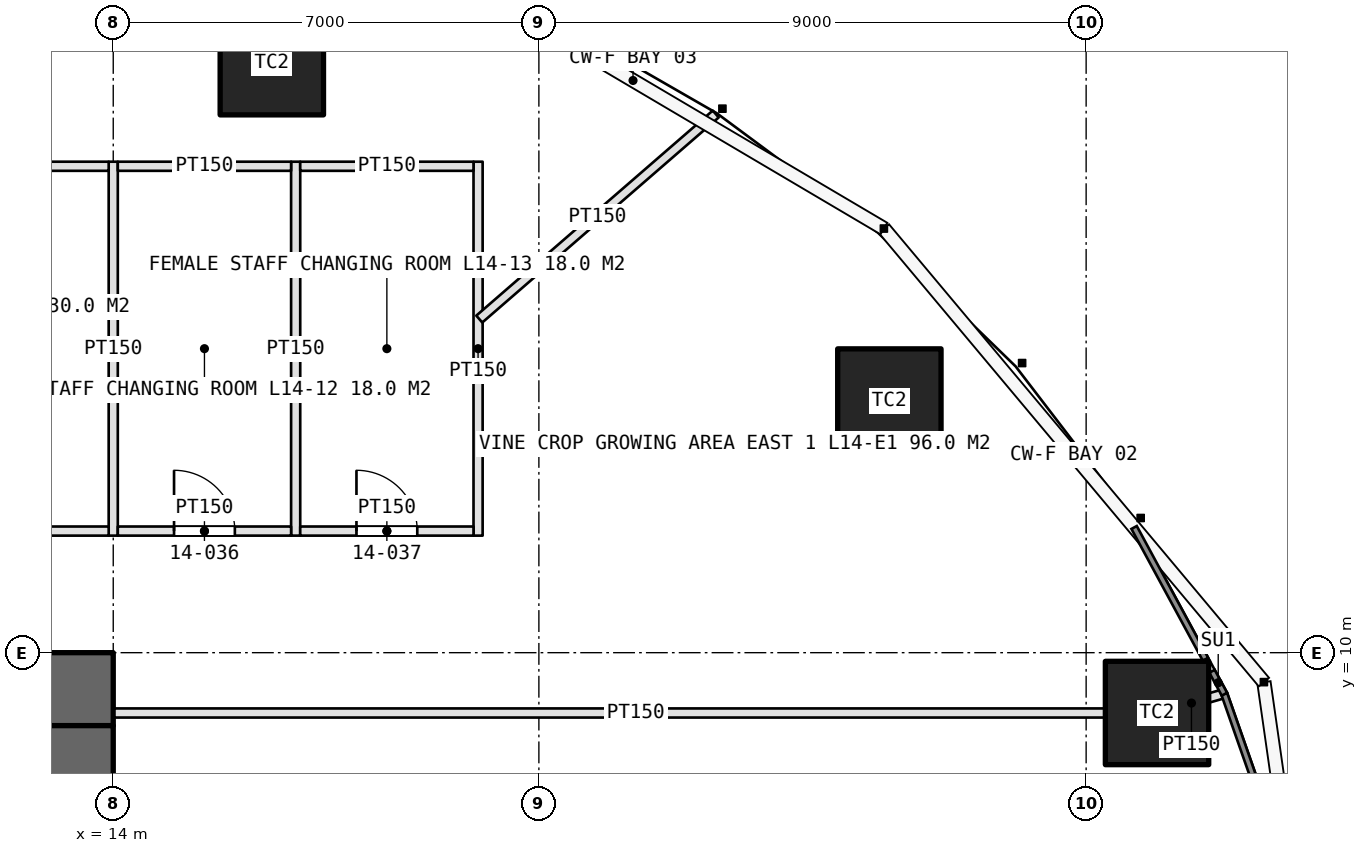
"""IFC4 building model, lengths in metres.
Left out: names, types, materials, properties, quantities, classifications, styles, units other than length and angle.
Written with IfcOpenShell. Run it as: python <this file> out.ifc"""

import sys

from ifc_helpers import new_model, si_unit, direction, frame, frame_2d, origin, origin_2d, place, context, subcontext, project, spatial, rectangle, extrude, element, fill, save


model = new_model("IFC4")
c1 = context("Model", 3, precision=1e-05, world=origin(), true_north=direction((0.0, 1.0)))
c2 = subcontext(c1, "Body", "Model", "MODEL_VIEW")
j1 = project(units=[si_unit("LENGTHUNIT", "METRE"), si_unit("PLANEANGLEUNIT", "RADIAN")], contexts=[c1])
p1 = place(None, origin())
s1 = spatial("IfcSite", under=j1, at=p1, CompositionType="ELEMENT")
p2 = place(p1, origin())
s2 = spatial("IfcBuilding", under=s1, at=p2, CompositionType="ELEMENT")
p3 = place(p2, frame((0.0, 0.0, 70.0)))
s3 = spatial("IfcBuildingStorey", under=s2, at=p3, CompositionType="ELEMENT", Elevation=70.0)
p4 = place(p3, frame((14.0, 9.4, 0.0), z_axis=(0.0, 0.0, 1.0), x_axis=(-1.0, 0.0, 0.0)))
e1 = element("IfcWall", 1, at=p4, inside=s3, PredefinedType="SHEAR", context=c2, shape_type="SweptSolid", body=[
    extrude(rectangle(XDim=28.0, YDim=1.2, at=frame_2d((14.0, 0.0))), origin(), (0.0, 0.0, 1.0), 5.0),
])
p5 = place(p4, frame((24.0, 0.0, 0.0)))
e2 = element("IfcOpeningElement", 2, at=p5, cuts=e1, PredefinedType="OPENING", context=c2, shape_type="SweptSolid", body=[
    extrude(rectangle(XDim=1.0, YDim=2.4, at=frame_2d((0.5, 1.2))), frame((0.0, 0.61, 0.0), z_axis=(0.0, -1.0, 0.0), x_axis=(1.0, 0.0, 0.0)), (0.0, 0.0, 1.0), 1.22),
])
p6 = place(p4, frame((13.1, 0.0, 0.0)))
e3 = element("IfcOpeningElement", 3, at=p6, cuts=e1, PredefinedType="OPENING", context=c2, shape_type="SweptSolid", body=[
    extrude(rectangle(XDim=1.8, YDim=2.4, at=frame_2d((0.9, 1.2))), frame((0.0, 0.61, 0.0), z_axis=(0.0, -1.0, 0.0), x_axis=(1.0, 0.0, 0.0)), (0.0, 0.0, 1.0), 1.22),
])
p7 = place(p3, frame((13.4, -8.8, 0.0), z_axis=(0.0, 0.0, 1.0), x_axis=(0.0, 1.0, 0.0)))
e4 = element("IfcWall", 4, at=p7, inside=s3, PredefinedType="SHEAR", context=c2, shape_type="SweptSolid", body=[
    extrude(rectangle(XDim=17.6, YDim=1.2, at=frame_2d((8.8, 0.0))), origin(), (0.0, 0.0, 1.0), 5.0),
])
p8 = place(p7, frame((7.9, 0.0, 0.0)))
e5 = element("IfcOpeningElement", 5, at=p8, cuts=e4, PredefinedType="OPENING", context=c2, shape_type="SweptSolid", body=[
    extrude(rectangle(XDim=1.8, YDim=2.4, at=frame_2d((0.9, 1.2))), frame((0.0, 0.61, 0.0), z_axis=(0.0, -1.0, 0.0), x_axis=(1.0, 0.0, 0.0)), (0.0, 0.0, 1.0), 1.22),
])
for number, where, z_axis, x_axis in (
    (6, (31.166, 9.008, 0.0), (0.0, 0.0, 1.0), (1.0, 0.0, 0.0)),
    (7, (26.764, 14.147, 0.0), (0.0, 0.0, 1.0), (1.0, 0.0, 0.0)),
    (8, (16.608, 19.695, 0.0), (0.0, 0.0, 1.0), (1.0, 0.0, 0.0)),
):
    element("IfcColumn", number, at=place(p3, frame(where, z_axis=z_axis, x_axis=x_axis)), inside=s3, PredefinedType="COLUMN", context=c2, shape_type="SweptSolid", body=[
        extrude(rectangle(XDim=1.7, YDim=1.7, at=origin_2d()), origin(), (0.0, 0.0, 1.0), 5.0),
    ])
for number, where, z_axis, x_axis in (
    (9, (14.0, 11.925, 0.0), (0.0, 0.0, 1.0), (0.0, 1.0, 0.0)),
    (10, (17.0, 11.925, 0.0), (0.0, 0.0, 1.0), (0.0, 1.0, 0.0)),
    (11, (20.0, 11.925, 0.0), (0.0, 0.0, 1.0), (0.0, 1.0, 0.0)),
):
    element("IfcWall", number, at=place(p3, frame(where, z_axis=z_axis, x_axis=x_axis)), inside=s3, PredefinedType="PARTITIONING", context=c2, shape_type="SweptSolid", body=[
        extrude(rectangle(XDim=6.15, YDim=0.15, at=frame_2d((3.075, 0.0))), origin(), (0.0, 0.0, 1.0), 3.6),
    ])
p9 = place(p3, frame((9.075, 12.0, 0.0), z_axis=(0.0, 0.0, 1.0), x_axis=(1.0, 0.0, 0.0)))
e12 = element("IfcWall", 12, at=p9, inside=s3, PredefinedType="PARTITIONING", context=c2, shape_type="SweptSolid", body=[
    extrude(rectangle(XDim=4.85, YDim=0.15, at=frame_2d((2.425, 0.0))), origin(), (0.0, 0.0, 1.0), 3.6),
])
p10 = place(p9, frame((1.875, 0.0, 0.0)))
e13 = element("IfcOpeningElement", 13, at=p10, cuts=e12, PredefinedType="OPENING", context=c2, shape_type="SweptSolid", body=[
    extrude(rectangle(XDim=1.1, YDim=2.3, at=frame_2d((0.55, 1.15))), frame((0.0, 0.085, 0.0), z_axis=(0.0, -1.0, 0.0), x_axis=(1.0, 0.0, 0.0)), (0.0, 0.0, 1.0), 0.17),
])
p11 = place(p3, frame((9.075, 18.0, 0.0), z_axis=(0.0, 0.0, 1.0), x_axis=(1.0, 0.0, 0.0)))
e14 = element("IfcWall", 14, at=p11, inside=s3, PredefinedType="PARTITIONING", context=c2, shape_type="SweptSolid", body=[
    extrude(rectangle(XDim=4.85, YDim=0.15, at=frame_2d((2.425, 0.0))), origin(), (0.0, 0.0, 1.0), 3.6),
])
p12 = place(p3, frame((14.075, 12.0, 0.0), z_axis=(0.0, 0.0, 1.0), x_axis=(1.0, 0.0, 0.0)))
e15 = element("IfcWall", 15, at=p12, inside=s3, PredefinedType="PARTITIONING", context=c2, shape_type="SweptSolid", body=[
    extrude(rectangle(XDim=2.85, YDim=0.15, at=frame_2d((1.425, 0.0))), origin(), (0.0, 0.0, 1.0), 3.6),
])
p13 = place(p12, frame((0.925, 0.0, 0.0)))
e16 = element("IfcOpeningElement", 16, at=p13, cuts=e15, PredefinedType="OPENING", context=c2, shape_type="SweptSolid", body=[
    extrude(rectangle(XDim=1.0, YDim=2.2, at=frame_2d((0.5, 1.1))), frame((0.0, 0.085, 0.0), z_axis=(0.0, -1.0, 0.0), x_axis=(1.0, 0.0, 0.0)), (0.0, 0.0, 1.0), 0.17),
])
p14 = place(p3, frame((14.075, 18.0, 0.0), z_axis=(0.0, 0.0, 1.0), x_axis=(1.0, 0.0, 0.0)))
e17 = element("IfcWall", 17, at=p14, inside=s3, PredefinedType="PARTITIONING", context=c2, shape_type="SweptSolid", body=[
    extrude(rectangle(XDim=2.85, YDim=0.15, at=frame_2d((1.425, 0.0))), origin(), (0.0, 0.0, 1.0), 3.6),
])
p15 = place(p3, frame((17.075, 12.0, 0.0), z_axis=(0.0, 0.0, 1.0), x_axis=(1.0, 0.0, 0.0)))
e18 = element("IfcWall", 18, at=p15, inside=s3, PredefinedType="PARTITIONING", context=c2, shape_type="SweptSolid", body=[
    extrude(rectangle(XDim=2.85, YDim=0.15, at=frame_2d((1.425, 0.0))), origin(), (0.0, 0.0, 1.0), 3.6),
])
p16 = place(p15, frame((0.925, 0.0, 0.0)))
e19 = element("IfcOpeningElement", 19, at=p16, cuts=e18, PredefinedType="OPENING", context=c2, shape_type="SweptSolid", body=[
    extrude(rectangle(XDim=1.0, YDim=2.2, at=frame_2d((0.5, 1.1))), frame((0.0, 0.085, 0.0), z_axis=(0.0, -1.0, 0.0), x_axis=(1.0, 0.0, 0.0)), (0.0, 0.0, 1.0), 0.17),
])
p17 = place(p3, frame((17.075, 18.0, 0.0), z_axis=(0.0, 0.0, 1.0), x_axis=(1.0, 0.0, 0.0)))
e20 = element("IfcWall", 20, at=p17, inside=s3, PredefinedType="PARTITIONING", context=c2, shape_type="SweptSolid", body=[
    extrude(rectangle(XDim=2.85, YDim=0.15, at=frame_2d((1.425, 0.0))), origin(), (0.0, 0.0, 1.0), 3.6),
])
p18 = place(p3, frame((20.02, 15.487, 0.0), z_axis=(0.0, 0.0, 1.0), x_axis=(0.755443308786, 0.655214016342, 0.0)))
e21 = element("IfcWall", 21, at=p18, inside=s3, PredefinedType="PARTITIONING", context=c2, shape_type="SweptSolid", body=[
    extrude(rectangle(XDim=5.147, YDim=0.15, at=frame_2d((2.573, 0.0))), origin(), (0.0, 0.0, 1.0), 3.6),
])
p19 = place(p3, frame((14.02, 9.008, 0.0), z_axis=(0.0, 0.0, 1.0), x_axis=(1.0, 0.0, 0.0)))
e22 = element("IfcWall", 22, at=p19, inside=s3, PredefinedType="PARTITIONING", context=c2, shape_type="SweptSolid", body=[
    extrude(rectangle(XDim=17.146, YDim=0.15, at=frame_2d((8.573, 0.0))), origin(), (0.0, 0.0, 1.0), 3.6),
])
p20 = place(p3, frame((31.166, 9.008, 0.0), z_axis=(0.0, 0.0, 1.0), x_axis=(0.960777970385, 0.277318754547, 0.0)))
e23 = element("IfcWall", 23, at=p20, inside=s3, PredefinedType="PARTITIONING", context=c2, shape_type="SweptSolid", body=[
    extrude(rectangle(XDim=1.179, YDim=0.15, at=frame_2d((0.589, 0.0))), origin(), (0.0, 0.0, 1.0), 3.6),
])
p21 = place(p13, origin())
e24 = element("IfcDoor", 24, at=p21, inside=s3, OperationType="SINGLE_SWING_LEFT", PredefinedType="DOOR", context=c2, shape_type="SweptSolid", body=[
    extrude(rectangle(XDim=1.0, YDim=2.2, at=frame_2d((0.5, 1.1))), frame((0.0, 0.025, 0.0), z_axis=(0.0, -1.0, 0.0), x_axis=(1.0, 0.0, 0.0)), (0.0, 0.0, 1.0), 0.05),
])
fill(e16, e24)
p22 = place(p16, origin())
e25 = element("IfcDoor", 25, at=p22, inside=s3, OperationType="SINGLE_SWING_LEFT", PredefinedType="DOOR", context=c2, shape_type="SweptSolid", body=[
    extrude(rectangle(XDim=1.0, YDim=2.2, at=frame_2d((0.5, 1.1))), frame((0.0, 0.025, 0.0), z_axis=(0.0, -1.0, 0.0), x_axis=(1.0, 0.0, 0.0)), (0.0, 0.0, 1.0), 0.05),
])
fill(e19, e25)
save(model, sys.argv[1])
